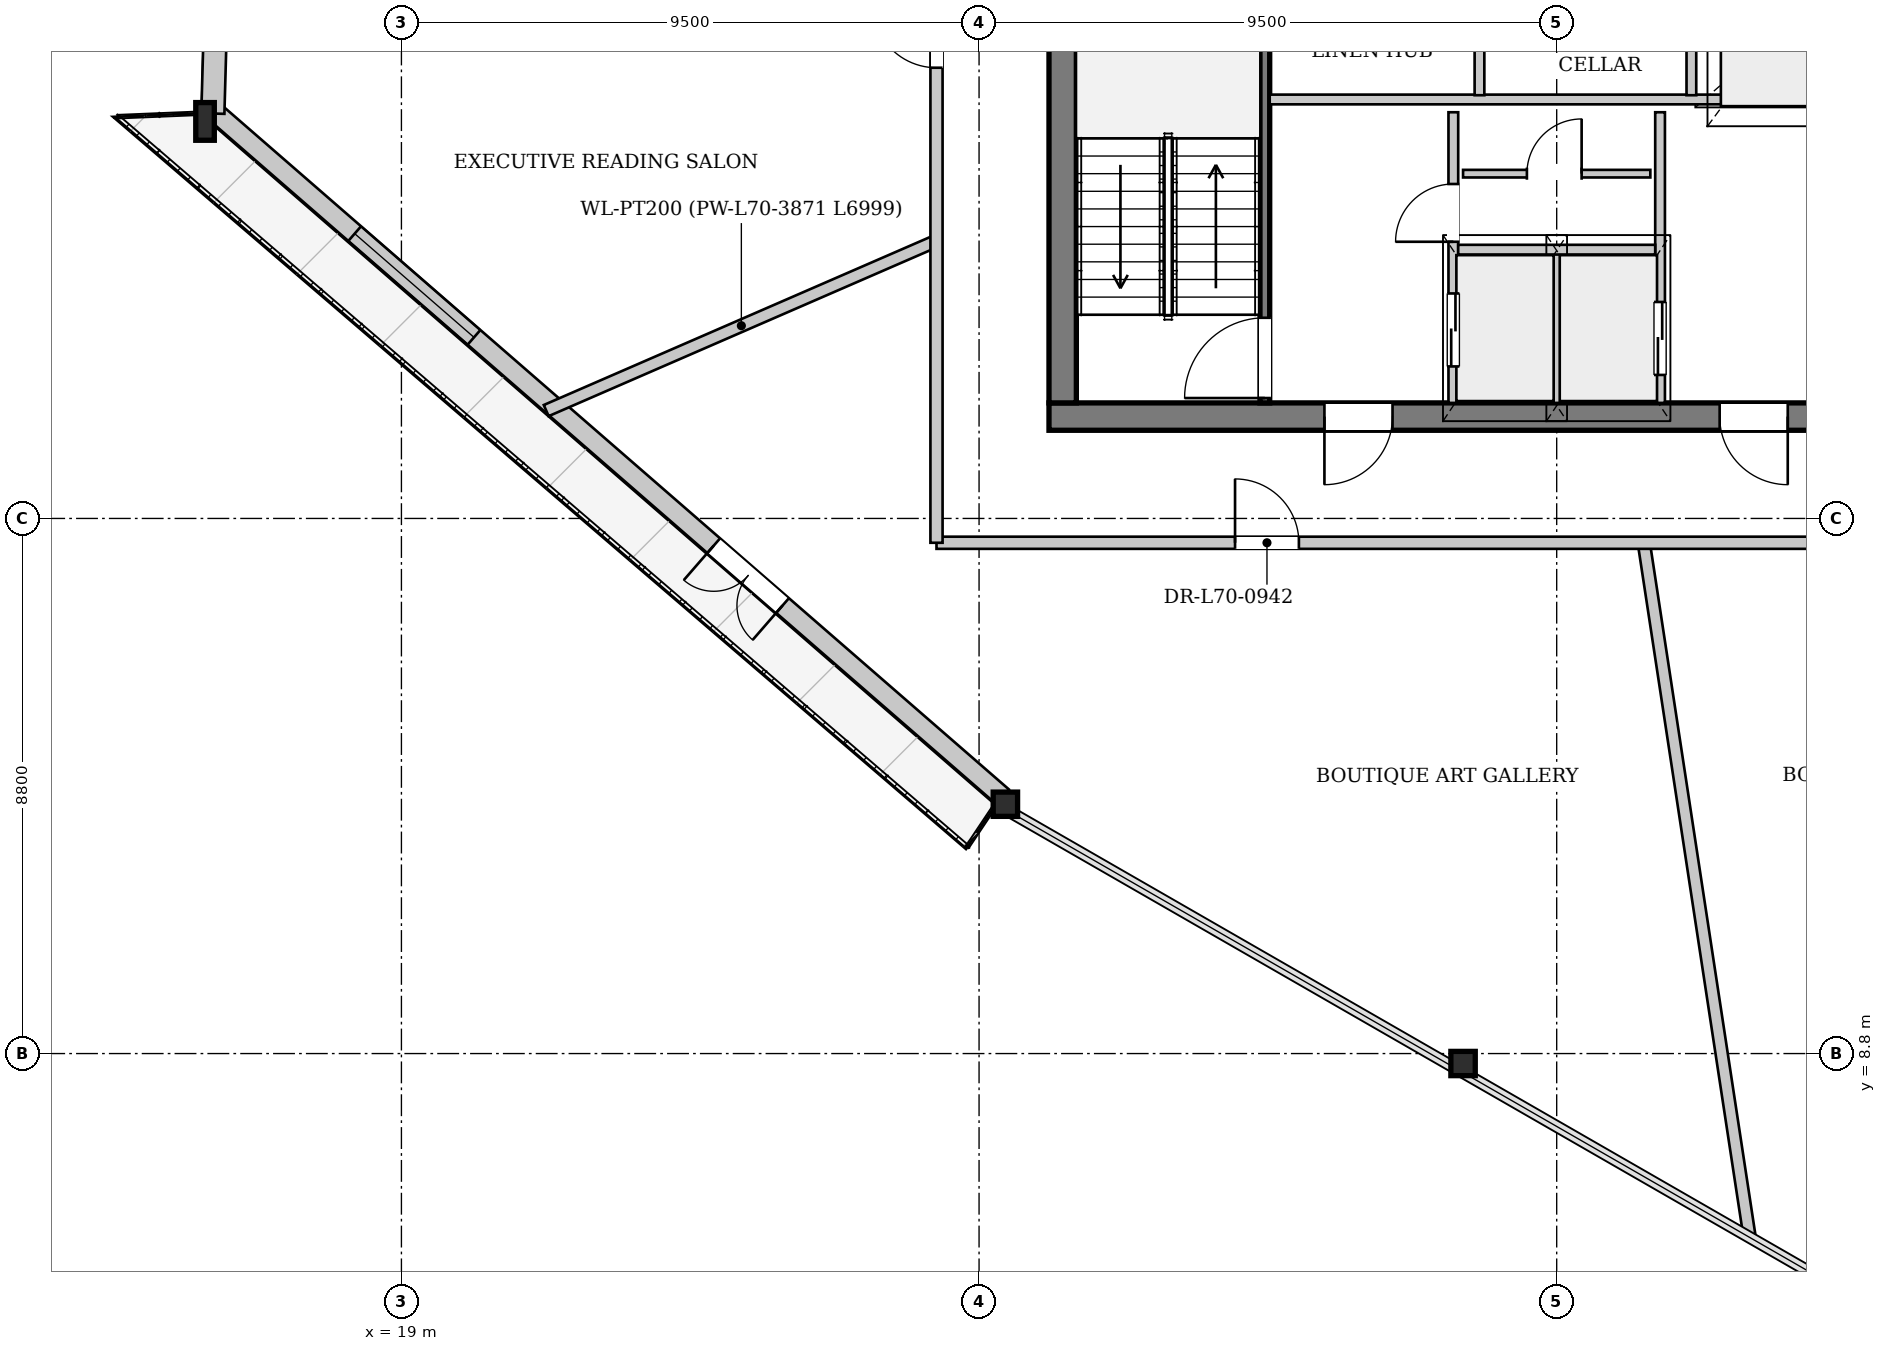
"""IFC4 building model, lengths in metres.
Left out: names, types, materials, properties, quantities, classifications, styles, units other than length and angle.
Written with IfcOpenShell. Run it as: python <this file> out.ifc"""

import sys

from ifc_helpers import new_model, si_unit, direction, frame, frame_2d, origin, origin_2d, place, context, subcontext, project, spatial, rectangle, i_section, extrude, source, transform, mapped, element, fill, save


model = new_model("IFC4")
c1 = context("Model", 3, precision=1e-05, world=origin(), true_north=direction((0.0, 1.0)))
c2 = subcontext(c1, "Body", "Model", "MODEL_VIEW")
j1 = project(units=[si_unit("LENGTHUNIT", "METRE"), si_unit("PLANEANGLEUNIT", "RADIAN")], contexts=[c1])
p1 = place(None, origin())
s1 = spatial("IfcSite", under=j1, at=p1, CompositionType="ELEMENT")
p2 = place(p1, origin())
s2 = spatial("IfcBuilding", under=s1, at=p2, CompositionType="ELEMENT")
p3 = place(p2, frame((0.0, 0.0, 263.3)))
s3 = spatial("IfcBuildingStorey", under=s2, at=p3, CompositionType="ELEMENT", Elevation=263.3)
m1 = source(origin(), c2, "Body", "SweptSolid", [
    extrude(i_section(OverallWidth=0.305, OverallDepth=0.62, WebThickness=0.021, FlangeThickness=0.04, at=origin_2d()), origin(), (0.0, 0.0, 1.0), 3.448),
])
p4 = place(p3, frame((15.709, 24.264, 0.0), z_axis=(0.035475827357, -0.078315898318, 0.996297187462), x_axis=(0.910901618145, 0.41262360822, 0.0)))
e1 = element("IfcColumn", 1, at=p4, inside=s3, PredefinedType="COLUMN", context=c2, shape_type="MappedRepresentation", body=[
    mapped(m1, transform((0.0, 0.0, 0.0), x_axis=(1.0, 0.0, 0.0), y_axis=(0.0, 1.0, 0.0), z_axis=(0.0, 0.0, 1.0), scale=1.0)),
])
m2 = source(origin(), c2, "Body", "SweptSolid", [
    extrude(i_section(OverallWidth=0.401, OverallDepth=0.399, WebThickness=0.022, FlangeThickness=0.034, at=origin_2d()), origin(), (0.0, 0.0, 1.0), 3.449),
])
p5 = place(p3, frame((28.78, 12.904, 0.0), z_axis=(0.088773726193, -0.002052980909, 0.99604970298), x_axis=(0.023119815262, 0.999732701347, 0.0)))
e2 = element("IfcColumn", 2, at=p5, inside=s3, PredefinedType="COLUMN", context=c2, shape_type="MappedRepresentation", body=[
    mapped(m2, transform((0.0, 0.0, 0.0), x_axis=(1.0, 0.0, 0.0), y_axis=(0.0, 1.0, 0.0), z_axis=(0.0, 0.0, 1.0), scale=1.0)),
])
m3 = source(origin(), c2, "Body", "SweptSolid", [
    extrude(i_section(OverallWidth=0.401, OverallDepth=0.399, WebThickness=0.022, FlangeThickness=0.034, at=origin_2d()), origin(), (0.0, 0.0, 1.0), 3.454),
])
p6 = place(p3, frame((36.286, 8.587, 0.0), z_axis=(0.100653191189, 0.028414735153, 0.994515730358), x_axis=(-0.271684886517, 0.962386264677, 0.0)))
e3 = element("IfcColumn", 3, at=p6, inside=s3, PredefinedType="COLUMN", context=c2, shape_type="MappedRepresentation", body=[
    mapped(m3, transform((0.0, 0.0, 0.0), x_axis=(1.0, 0.0, 0.0), y_axis=(0.0, 1.0, 0.0), z_axis=(0.0, 0.0, 1.0), scale=1.0)),
])
p7 = place(p3, frame((28.885, 13.024, 0.0), z_axis=(0.0, 0.0, 1.0), x_axis=(-0.754757555723, 0.656003835415, 0.0)))
e4 = element("IfcWall", 4, at=p7, inside=s3, PredefinedType="SOLIDWALL", context=c2, shape_type="SweptSolid", body=[
    extrude(rectangle(XDim=17.318, YDim=0.32, at=frame_2d((8.659, 0.0))), origin(), (0.0, 0.0, 1.0), 2.872),
])
p8 = place(p7, frame((4.792, 0.0, 0.0)))
e5 = element("IfcOpeningElement", 5, at=p8, cuts=e4, PredefinedType="OPENING", context=c2, shape_type="SweptSolid", body=[
    extrude(rectangle(XDim=1.5, YDim=2.3, at=frame_2d((0.75, 1.15))), frame((0.0, 0.17, 0.0), z_axis=(0.0, -1.0, 0.0), x_axis=(1.0, 0.0, 0.0)), (0.0, 0.0, 1.0), 0.34),
])
p9 = place(p7, frame((11.515, 0.0, 0.402)))
e6 = element("IfcOpeningElement", 6, at=p9, cuts=e4, PredefinedType="OPENING", context=c2, shape_type="SweptSolid", body=[
    extrude(rectangle(XDim=2.6, YDim=2.35, at=frame_2d((1.3, 1.175))), frame((0.0, 0.17, 0.0), z_axis=(0.0, -1.0, 0.0), x_axis=(1.0, 0.0, 0.0)), (0.0, 0.0, 1.0), 0.34),
])
p10 = place(p3, frame((15.899, 24.259, 0.0), z_axis=(0.0, 0.0, 1.0), x_axis=(0.027933207755, 0.999609791821, 0.0)))
e7 = element("IfcWall", 7, at=p10, inside=s3, PredefinedType="SOLIDWALL", context=c2, shape_type="SweptSolid", body=[
    extrude(rectangle(XDim=2.57, YDim=0.38, at=frame_2d((1.285, 0.0))), origin(), (0.0, 0.0, 1.0), 2.872),
])
p11 = place(p3, frame((46.35, 19.275, 0.0), z_axis=(0.0, 0.0, 1.0), x_axis=(-1.0, 0.0, 0.0)))
e8 = element("IfcWall", 8, at=p11, inside=s3, PredefinedType="SHEAR", context=c2, shape_type="SweptSolid", body=[
    extrude(rectangle(XDim=16.7, YDim=0.45, at=frame_2d((8.35, 0.0))), origin(), (0.0, 0.0, 1.0), 3.38),
])
p12 = place(p11, frame((4.55, 0.0, 0.0)))
e9 = element("IfcOpeningElement", 9, at=p12, cuts=e8, PredefinedType="OPENING", context=c2, shape_type="SweptSolid", body=[
    extrude(rectangle(XDim=1.12, YDim=2.25, at=frame_2d((0.56, 1.125))), frame((0.0, 0.235, 0.0), z_axis=(0.0, -1.0, 0.0), x_axis=(1.0, 0.0, 0.0)), (0.0, 0.0, 1.0), 0.47),
])
p13 = place(p11, frame((11.05, 0.0, 0.0)))
e10 = element("IfcOpeningElement", 10, at=p13, cuts=e8, PredefinedType="OPENING", context=c2, shape_type="SweptSolid", body=[
    extrude(rectangle(XDim=1.12, YDim=2.25, at=frame_2d((0.56, 1.125))), frame((0.0, 0.235, 0.0), z_axis=(0.0, -1.0, 0.0), x_axis=(1.0, 0.0, 0.0)), (0.0, 0.0, 1.0), 0.47),
])
p14 = place(p3, frame((29.875, 19.5, 0.0), z_axis=(0.0, 0.0, 1.0), x_axis=(0.0, 1.0, 0.0)))
e11 = element("IfcWall", 11, at=p14, inside=s3, PredefinedType="SHEAR", context=c2, shape_type="SweptSolid", body=[
    extrude(rectangle(XDim=14.2, YDim=0.45, at=frame_2d((7.1, 0.0))), origin(), (0.0, 0.0, 1.0), 3.38),
])
p15 = place(p14, frame((7.42, 0.0, 0.0)))
e12 = element("IfcOpeningElement", 12, at=p15, cuts=e11, PredefinedType="OPENING", context=c2, shape_type="SweptSolid", body=[
    extrude(rectangle(XDim=1.6, YDim=2.2, at=frame_2d((0.8, 1.1))), frame((0.0, 0.235, 0.0), z_axis=(0.0, -1.0, 0.0), x_axis=(1.0, 0.0, 0.0)), (0.0, 0.0, 1.0), 0.47),
])
p16 = place(p3, frame((33.2, 19.5, 0.0), z_axis=(0.0, 0.0, 1.0), x_axis=(0.0, 1.0, 0.0)))
e13 = element("IfcWall", 13, at=p16, inside=s3, PredefinedType="PARTITIONING", context=c2, shape_type="SweptSolid", body=[
    extrude(rectangle(XDim=7.46, YDim=0.16, at=frame_2d((3.73, 0.0))), origin(), (0.0, 0.0, 1.0), 3.38),
])
p17 = place(p16, frame((0.08, 0.0, 0.0)))
e14 = element("IfcOpeningElement", 14, at=p17, cuts=e13, PredefinedType="OPENING", context=c2, shape_type="SweptSolid", body=[
    extrude(rectangle(XDim=1.32, YDim=2.2, at=frame_2d((0.66, 1.1))), frame((0.0, 0.09, 0.0), z_axis=(0.0, -1.0, 0.0), x_axis=(1.0, 0.0, 0.0)), (0.0, 0.0, 1.0), 0.18),
])
p18 = place(p3, frame((36.3, 19.5, 0.0), z_axis=(0.0, 0.0, 1.0), x_axis=(0.0, 1.0, 0.0)))
e15 = element("IfcWall", 15, at=p18, inside=s3, PredefinedType="PARTITIONING", context=c2, shape_type="SweptSolid", body=[
    extrude(rectangle(XDim=4.78, YDim=0.16, at=frame_2d((2.39, 0.0))), origin(), (0.0, 0.0, 1.0), 3.38),
])
p19 = place(p18, frame((0.6, 0.0, 0.0)))
e16 = element("IfcOpeningElement", 16, at=p19, cuts=e15, PredefinedType="OPENING", context=c2, shape_type="SweptSolid", body=[
    extrude(rectangle(XDim=1.2, YDim=2.2, at=frame_2d((0.6, 1.1))), frame((0.0, 0.09, 0.0), z_axis=(0.0, -1.0, 0.0), x_axis=(1.0, 0.0, 0.0)), (0.0, 0.0, 1.0), 0.18),
])
p20 = place(p18, frame((2.65, 0.0, 0.0)))
e17 = element("IfcOpeningElement", 17, at=p20, cuts=e15, PredefinedType="OPENING", context=c2, shape_type="SweptSolid", body=[
    extrude(rectangle(XDim=0.95, YDim=2.1, at=frame_2d((0.475, 1.05))), frame((0.0, 0.09, 0.0), z_axis=(0.0, -1.0, 0.0), x_axis=(1.0, 0.0, 0.0)), (0.0, 0.0, 1.0), 0.18),
])
p21 = place(p3, frame((39.7, 24.28, 0.0), z_axis=(0.0, 0.0, 1.0), x_axis=(0.0, -1.0, 0.0)))
e18 = element("IfcWall", 18, at=p21, inside=s3, PredefinedType="PARTITIONING", context=c2, shape_type="SweptSolid", body=[
    extrude(rectangle(XDim=4.78, YDim=0.16, at=frame_2d((2.39, 0.0))), origin(), (0.0, 0.0, 1.0), 3.38),
])
p22 = place(p21, frame((3.12, 0.0, 0.0)))
e19 = element("IfcOpeningElement", 19, at=p22, cuts=e18, PredefinedType="OPENING", context=c2, shape_type="SweptSolid", body=[
    extrude(rectangle(XDim=1.2, YDim=2.2, at=frame_2d((0.6, 1.1))), frame((0.0, 0.09, 0.0), z_axis=(0.0, -1.0, 0.0), x_axis=(1.0, 0.0, 0.0)), (0.0, 0.0, 1.0), 0.18),
])
p23 = place(p3, frame((38.0, 19.5, 0.0), z_axis=(0.0, 0.0, 1.0), x_axis=(0.0, 1.0, 0.0)))
e20 = element("IfcWall", 20, at=p23, inside=s3, PredefinedType="PARTITIONING", context=c2, shape_type="SweptSolid", body=[
    extrude(rectangle(XDim=2.46, YDim=0.125, at=frame_2d((1.23, 0.0))), origin(), (0.0, 0.0, 1.0), 3.38),
])
p24 = place(p3, frame((36.38, 22.02, 0.0), z_axis=(0.0, 0.0, 1.0), x_axis=(1.0, 0.0, 0.0)))
e21 = element("IfcWall", 21, at=p24, inside=s3, PredefinedType="PARTITIONING", context=c2, shape_type="SweptSolid", body=[
    extrude(rectangle(XDim=3.24, YDim=0.16, at=frame_2d((1.62, 0.0))), origin(), (0.0, 0.0, 1.0), 3.38),
])
p25 = place(p3, frame((33.28, 24.49, 0.0), z_axis=(0.0, 0.0, 1.0), x_axis=(1.0, 0.0, 0.0)))
e22 = element("IfcWall", 22, at=p25, inside=s3, PredefinedType="PARTITIONING", context=c2, shape_type="SweptSolid", body=[
    extrude(rectangle(XDim=9.44, YDim=0.16, at=frame_2d((4.72, 0.0))), origin(), (0.0, 0.0, 1.0), 3.38),
])
p26 = place(p3, frame((36.46, 23.27, 0.0), z_axis=(0.0, 0.0, 1.0), x_axis=(1.0, 0.0, 0.0)))
e23 = element("IfcWall", 23, at=p26, inside=s3, PredefinedType="PARTITIONING", context=c2, shape_type="SweptSolid", body=[
    extrude(rectangle(XDim=3.08, YDim=0.125, at=frame_2d((1.54, 0.0))), origin(), (0.0, 0.0, 1.0), 3.38),
])
p27 = place(p26, frame((1.05, 0.0, 0.0)))
e24 = element("IfcOpeningElement", 24, at=p27, cuts=e23, PredefinedType="OPENING", context=c2, shape_type="SweptSolid", body=[
    extrude(rectangle(XDim=0.9, YDim=2.1, at=frame_2d((0.45, 1.05))), frame((0.0, 0.073, 0.0), z_axis=(0.0, -1.0, 0.0), x_axis=(1.0, 0.0, 0.0)), (0.0, 0.0, 1.0), 0.145),
])
for number, where, z_axis, x_axis in (
    (25, (36.73, 24.56, 0.0), (0.0, 0.0, 1.0), (0.0, 1.0, 0.0)),
    (26, (40.215, 24.56, 0.0), (0.0, 0.0, 1.0), (0.0, 1.0, 0.0)),
):
    element("IfcWall", number, at=place(p3, frame(where, z_axis=z_axis, x_axis=x_axis)), inside=s3, PredefinedType="PARTITIONING", context=c2, shape_type="SweptSolid", body=[
        extrude(rectangle(XDim=2.31, YDim=0.16, at=frame_2d((1.155, 0.0))), origin(), (0.0, 0.0, 1.0), 3.38),
    ])
p28 = place(p3, frame((27.8, 22.165, 0.0), z_axis=(0.0, 0.0, 1.0), x_axis=(-0.917061183567, -0.398746517973, 0.0)))
e27 = element("IfcWall", 27, at=p28, inside=s3, PredefinedType="PARTITIONING", context=c2, shape_type="SweptSolid", body=[
    extrude(rectangle(XDim=7.0, YDim=0.2, at=frame_2d((3.5, 0.0))), origin(), (0.0, 0.0, 1.0), 3.38),
])
p29 = place(p3, frame((39.433, 17.2, 0.0), z_axis=(0.0, 0.0, 1.0), x_axis=(0.150639275807, -0.98858879651, 0.0)))
e28 = element("IfcWall", 28, at=p29, inside=s3, PredefinedType="PARTITIONING", context=c2, shape_type="SweptSolid", body=[
    extrude(rectangle(XDim=11.517, YDim=0.2, at=frame_2d((5.758, 0.0))), origin(), (0.0, 0.0, 1.0), 3.38),
])
p30 = place(p3, frame((27.8, 17.2, 0.0), z_axis=(0.0, 0.0, 1.0), x_axis=(1.0, 0.0, 0.0)))
e29 = element("IfcWall", 29, at=p30, inside=s3, PredefinedType="PARTITIONING", context=c2, shape_type="SweptSolid", body=[
    extrude(rectangle(XDim=20.4, YDim=0.2, at=frame_2d((10.2, 0.0))), origin(), (0.0, 0.0, 1.0), 3.38),
])
p31 = place(p30, frame((4.91, 0.0, 0.0)))
e30 = element("IfcOpeningElement", 30, at=p31, cuts=e29, PredefinedType="OPENING", context=c2, shape_type="SweptSolid", body=[
    extrude(rectangle(XDim=1.05, YDim=2.2, at=frame_2d((0.525, 1.1))), frame((0.0, 0.11, 0.0), z_axis=(0.0, -1.0, 0.0), x_axis=(1.0, 0.0, 0.0)), (0.0, 0.0, 1.0), 0.22),
])
p32 = place(p3, frame((27.8, 17.2, 0.0), z_axis=(0.0, 0.0, 1.0), x_axis=(0.0, 1.0, 0.0)))
e31 = element("IfcWall", 31, at=p32, inside=s3, PredefinedType="PARTITIONING", context=c2, shape_type="SweptSolid", body=[
    extrude(rectangle(XDim=18.54, YDim=0.2, at=frame_2d((9.27, 0.0))), origin(), (0.0, 0.0, 1.0), 3.38),
])
p33 = place(p32, frame((15.043, 0.0, 0.0)))
e32 = element("IfcOpeningElement", 32, at=p33, cuts=e31, PredefinedType="OPENING", context=c2, shape_type="SweptSolid", body=[
    extrude(rectangle(XDim=1.05, YDim=2.2, at=frame_2d((0.525, 1.1))), frame((0.0, 0.11, 0.0), z_axis=(0.0, -1.0, 0.0), x_axis=(1.0, 0.0, 0.0)), (0.0, 0.0, 1.0), 0.22),
])
p34 = place(p32, frame((7.812, 0.0, 0.0)))
e33 = element("IfcOpeningElement", 33, at=p34, cuts=e31, PredefinedType="OPENING", context=c2, shape_type="SweptSolid", body=[
    extrude(rectangle(XDim=1.05, YDim=2.2, at=frame_2d((0.525, 1.1))), frame((0.0, 0.11, 0.0), z_axis=(0.0, -1.0, 0.0), x_axis=(1.0, 0.0, 0.0)), (0.0, 0.0, 1.0), 0.22),
])
m4 = source(origin(), c2, "Body", "SweptSolid", [
    extrude(rectangle(XDim=1.5, YDim=2.3, at=frame_2d((0.75, 1.15))), frame((0.0, 0.025, 0.0), z_axis=(0.0, -1.0, 0.0), x_axis=(1.0, 0.0, 0.0)), (0.0, 0.0, 1.0), 0.05),
])
p35 = place(p8, origin())
e34 = element("IfcDoor", 34, at=p35, inside=s3, OperationType="DOUBLE_DOOR_SINGLE_SWING", PredefinedType="DOOR", context=c2, shape_type="MappedRepresentation", body=[
    mapped(m4, transform((0.0, 0.0, 0.0), x_axis=(1.0, 0.0, 0.0), y_axis=(0.0, 1.0, 0.0), z_axis=(0.0, 0.0, 1.0), scale=1.0)),
])
fill(e5, e34)
m5 = source(origin(), c2, "Body", "SweptSolid", [
    extrude(rectangle(XDim=2.6, YDim=2.35, at=frame_2d((1.3, 1.175))), frame((0.0, 0.03, 0.0), z_axis=(0.0, -1.0, 0.0), x_axis=(1.0, 0.0, 0.0)), (0.0, 0.0, 1.0), 0.06),
])
p36 = place(p9, origin())
e35 = element("IfcWindow", 35, at=p36, inside=s3, PartitioningType="SINGLE_PANEL", PredefinedType="WINDOW", context=c2, shape_type="MappedRepresentation", body=[
    mapped(m5, transform((0.0, 0.0, 0.0), x_axis=(1.0, 0.0, 0.0), y_axis=(0.0, 1.0, 0.0), z_axis=(0.0, 0.0, 1.0), scale=1.0)),
])
fill(e6, e35)
m6 = source(origin(), c2, "Body", "SweptSolid", [
    extrude(rectangle(XDim=1.12, YDim=2.25, at=frame_2d((0.56, 1.125))), frame((0.0, 0.025, 0.0), z_axis=(0.0, -1.0, 0.0), x_axis=(1.0, 0.0, 0.0)), (0.0, 0.0, 1.0), 0.05),
])
p37 = place(p12, origin())
e36 = element("IfcDoor", 36, at=p37, inside=s3, OperationType="SINGLE_SWING_LEFT", PredefinedType="DOOR", context=c2, shape_type="MappedRepresentation", body=[
    mapped(m6, transform((0.0, 0.0, 0.0), x_axis=(1.0, 0.0, 0.0), y_axis=(0.0, 1.0, 0.0), z_axis=(0.0, 0.0, 1.0), scale=1.0)),
])
fill(e9, e36)
p38 = place(p13, origin())
e37 = element("IfcDoor", 37, at=p38, inside=s3, OperationType="SINGLE_SWING_RIGHT", PredefinedType="DOOR", context=c2, shape_type="MappedRepresentation", body=[
    mapped(m6, transform((0.0, 0.0, 0.0), x_axis=(1.0, 0.0, 0.0), y_axis=(0.0, 1.0, 0.0), z_axis=(0.0, 0.0, 1.0), scale=1.0)),
])
fill(e10, e37)
m7 = source(origin(), c2, "Body", "SweptSolid", [
    extrude(rectangle(XDim=1.32, YDim=2.2, at=frame_2d((0.66, 1.1))), frame((0.0, 0.025, 0.0), z_axis=(0.0, -1.0, 0.0), x_axis=(1.0, 0.0, 0.0)), (0.0, 0.0, 1.0), 0.05),
])
p39 = place(p17, origin())
e38 = element("IfcDoor", 38, at=p39, inside=s3, OperationType="SINGLE_SWING_LEFT", PredefinedType="DOOR", context=c2, shape_type="MappedRepresentation", body=[
    mapped(m7, transform((0.0, 0.0, 0.0), x_axis=(1.0, 0.0, 0.0), y_axis=(0.0, 1.0, 0.0), z_axis=(0.0, 0.0, 1.0), scale=1.0)),
])
fill(e14, e38)
m8 = source(origin(), c2, "Body", "SweptSolid", [
    extrude(rectangle(XDim=1.2, YDim=2.2, at=frame_2d((0.6, 1.1))), frame((0.0, 0.025, 0.0), z_axis=(0.0, -1.0, 0.0), x_axis=(1.0, 0.0, 0.0)), (0.0, 0.0, 1.0), 0.05),
])
p40 = place(p19, origin())
e39 = element("IfcDoor", 39, at=p40, inside=s3, OperationType="DOUBLE_DOOR_SLIDING", PredefinedType="DOOR", context=c2, shape_type="MappedRepresentation", body=[
    mapped(m8, transform((0.0, 0.0, 0.0), x_axis=(1.0, 0.0, 0.0), y_axis=(0.0, 1.0, 0.0), z_axis=(0.0, 0.0, 1.0), scale=1.0)),
])
fill(e16, e39)
m9 = source(origin(), c2, "Body", "SweptSolid", [
    extrude(rectangle(XDim=0.95, YDim=2.1, at=frame_2d((0.475, 1.05))), frame((0.0, 0.025, 0.0), z_axis=(0.0, -1.0, 0.0), x_axis=(1.0, 0.0, 0.0)), (0.0, 0.0, 1.0), 0.05),
])
p41 = place(p20, origin())
e40 = element("IfcDoor", 40, at=p41, inside=s3, OperationType="SINGLE_SWING_LEFT", PredefinedType="DOOR", context=c2, shape_type="MappedRepresentation", body=[
    mapped(m9, transform((0.0, 0.0, 0.0), x_axis=(1.0, 0.0, 0.0), y_axis=(0.0, 1.0, 0.0), z_axis=(0.0, 0.0, 1.0), scale=1.0)),
])
fill(e17, e40)
m10 = source(origin(), c2, "Body", "SweptSolid", [
    extrude(rectangle(XDim=0.9, YDim=2.1, at=frame_2d((0.45, 1.05))), frame((0.0, 0.025, 0.0), z_axis=(0.0, -1.0, 0.0), x_axis=(1.0, 0.0, 0.0)), (0.0, 0.0, 1.0), 0.05),
])
p42 = place(p27, origin())
e41 = element("IfcDoor", 41, at=p42, inside=s3, OperationType="SINGLE_SWING_RIGHT", PredefinedType="DOOR", context=c2, shape_type="MappedRepresentation", body=[
    mapped(m10, transform((0.0, 0.0, 0.0), x_axis=(1.0, 0.0, 0.0), y_axis=(0.0, 1.0, 0.0), z_axis=(0.0, 0.0, 1.0), scale=1.0)),
])
fill(e24, e41)
p43 = place(p22, origin())
e42 = element("IfcDoor", 42, at=p43, inside=s3, OperationType="DOUBLE_DOOR_SLIDING", PredefinedType="DOOR", context=c2, shape_type="MappedRepresentation", body=[
    mapped(m8, transform((0.0, 0.0, 0.0), x_axis=(1.0, 0.0, 0.0), y_axis=(0.0, 1.0, 0.0), z_axis=(0.0, 0.0, 1.0), scale=1.0)),
])
fill(e19, e42)
m11 = source(origin(), c2, "Body", "SweptSolid", [
    extrude(rectangle(XDim=1.05, YDim=2.2, at=frame_2d((0.525, 1.1))), frame((0.0, 0.025, 0.0), z_axis=(0.0, -1.0, 0.0), x_axis=(1.0, 0.0, 0.0)), (0.0, 0.0, 1.0), 0.05),
])
p44 = place(p31, origin())
e43 = element("IfcDoor", 43, at=p44, inside=s3, OperationType="SINGLE_SWING_LEFT", PredefinedType="DOOR", context=c2, shape_type="MappedRepresentation", body=[
    mapped(m11, transform((0.0, 0.0, 0.0), x_axis=(1.0, 0.0, 0.0), y_axis=(0.0, 1.0, 0.0), z_axis=(0.0, 0.0, 1.0), scale=1.0)),
])
fill(e30, e43)
p45 = place(p34, origin())
e44 = element("IfcDoor", 44, at=p45, inside=s3, OperationType="SINGLE_SWING_RIGHT", PredefinedType="DOOR", context=c2, shape_type="MappedRepresentation", body=[
    mapped(m11, transform((0.0, 0.0, 0.0), x_axis=(1.0, 0.0, 0.0), y_axis=(0.0, 1.0, 0.0), z_axis=(0.0, 0.0, 1.0), scale=1.0)),
])
fill(e33, e44)
save(model, sys.argv[1])
